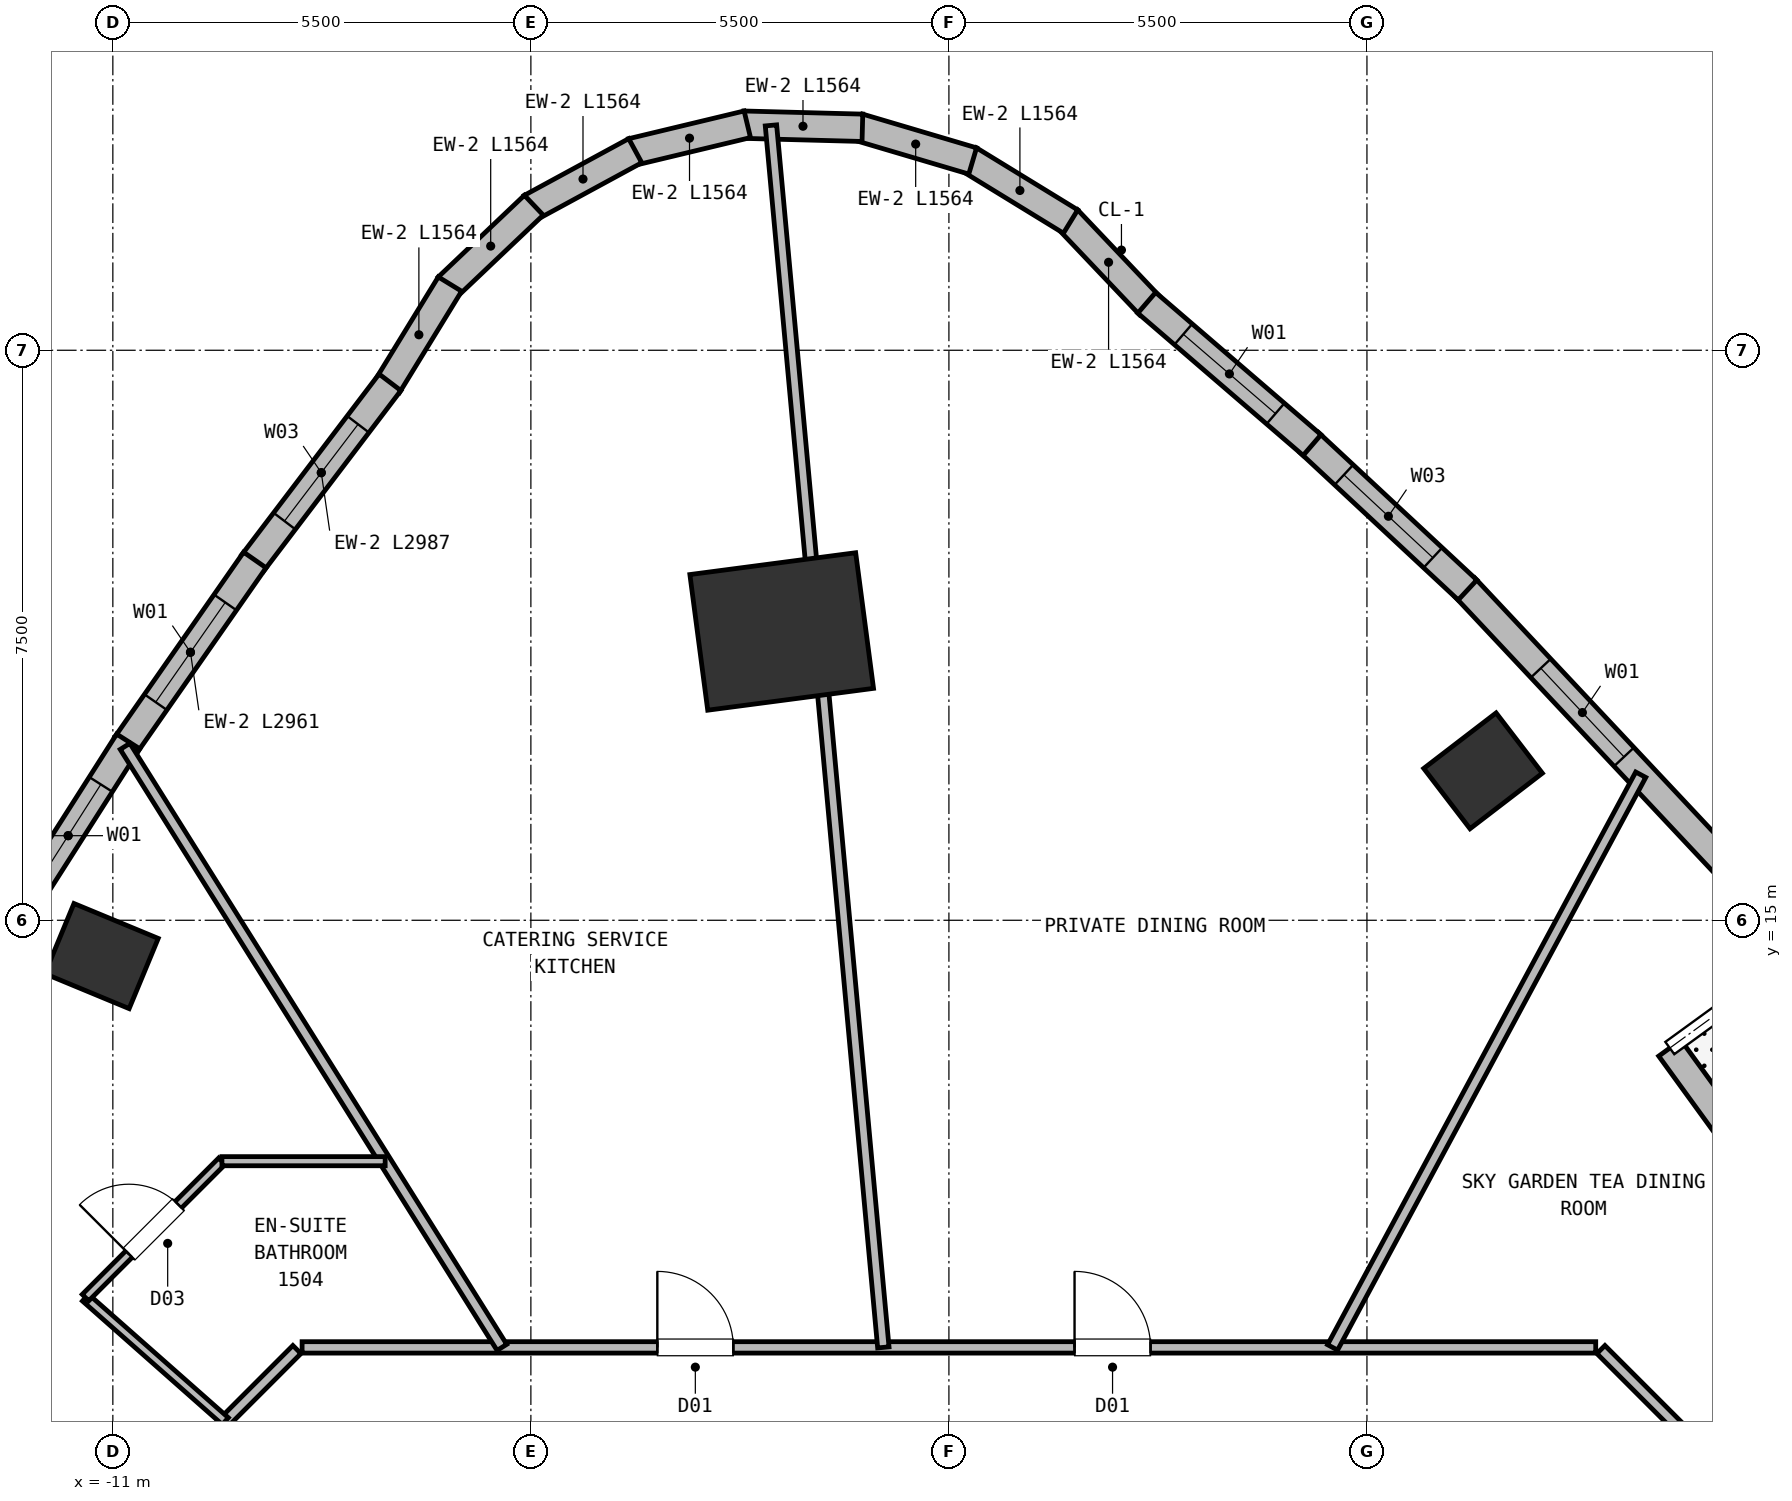
"""IFC4 building model, lengths in metres.
Left out: names, types, materials, properties, quantities, classifications, styles, units other than length and angle.
Written with IfcOpenShell. Run it as: python <this file> out.ifc"""

import sys

from ifc_helpers import new_model, si_unit, direction, frame, frame_2d, origin, origin_2d, place, context, subcontext, project, spatial, rectangle, extrude, element, fill, save


model = new_model("IFC4")
c1 = context("Model", 3, precision=1e-05, world=origin(), true_north=direction((0.0, 1.0)))
c2 = subcontext(c1, "Body", "Model", "MODEL_VIEW")
j1 = project(units=[si_unit("LENGTHUNIT", "METRE"), si_unit("PLANEANGLEUNIT", "RADIAN")], contexts=[c1])
p1 = place(None, origin())
s1 = spatial("IfcSite", under=j1, at=p1, CompositionType="ELEMENT")
p2 = place(p1, origin())
s2 = spatial("IfcBuilding", under=s1, at=p2, CompositionType="ELEMENT")
p3 = place(p2, frame((0.0, 0.0, 53.0)))
s3 = spatial("IfcBuildingStorey", under=s2, at=p3, CompositionType="ELEMENT", Elevation=53.0)
p4 = place(p3, frame((-2.2, 18.8, 0.0), z_axis=(0.0, 0.0, 1.0), x_axis=(-0.13052619222, 0.991444861374, 0.0)))
e1 = element("IfcColumn", 1, at=p4, inside=s3, PredefinedType="COLUMN", context=c2, shape_type="SweptSolid", body=[
    extrude(rectangle(XDim=1.8, YDim=2.2, at=origin_2d()), origin(), (0.0, 0.0, 1.0), 3.75),
])
for number, where, z_axis, x_axis in (
    (2, (-11.148, 14.529, 0.0), (0.0, 0.0, 1.0), (0.383, 0.924, 0.0)),
    (3, (7.028, 16.966, 0.0), (0.0, 0.0, 1.0), (-0.609, 0.793, 0.0)),
):
    element("IfcColumn", number, at=place(p3, frame(where, z_axis=z_axis, x_axis=x_axis)), inside=s3, PredefinedType="COLUMN", context=c2, shape_type="SweptSolid", body=[
        extrude(rectangle(XDim=1.0, YDim=1.2, at=origin_2d()), origin(), (0.0, 0.0, 1.0), 3.75),
    ])
p5 = place(p3, frame((9.485, 13.319, 0.0), z_axis=(0.0, 0.0, 1.0), x_axis=(0.587787785243, -0.809015154073, 0.0)))
e4 = element("IfcWall", 4, at=p5, inside=s3, PredefinedType="SOLIDWALL", context=c2, shape_type="SweptSolid", body=[
    extrude(rectangle(XDim=10.4, YDim=0.36, at=frame_2d((5.2, 0.0))), origin(), (0.0, 0.0, 1.0), 3.5),
])
p6 = place(p5, frame((6.0, 0.0, 0.0)))
e5 = element("IfcOpeningElement", 5, at=p6, cuts=e4, PredefinedType="OPENING", context=c2, shape_type="SweptSolid", body=[
    extrude(rectangle(XDim=1.65, YDim=2.25, at=frame_2d((0.825, 1.125))), frame((0.0, 0.19, 0.0), z_axis=(0.0, -1.0, 0.0), x_axis=(1.0, 0.0, 0.0)), (0.0, 0.0, 1.0), 0.38),
])
for number, where, z_axis, x_axis in (
    (6, (1.562, 24.225, 0.0), (0.0, 0.0, 1.0), (0.688, -0.725, 0.0)),
    (7, (0.267, 25.011, 0.0), (0.0, 0.0, 1.0), (0.853, -0.523, 0.0)),
):
    element("IfcWall", number, at=place(p3, frame(where, z_axis=z_axis, x_axis=x_axis)), inside=s3, PredefinedType="SOLIDWALL", context=c2, shape_type="SweptSolid", body=[
        extrude(rectangle(XDim=1.564, YDim=0.36, at=frame_2d((0.782, 0.0))), origin(), (0.0, 0.0, 1.0), 3.5),
    ])
p7 = place(p3, frame((-1.187, 25.435, 0.0), z_axis=(0.0, 0.0, 1.0), x_axis=(0.958804410816, -0.284067072714, 0.0)))
e8 = element("IfcWall", 8, at=p7, inside=s3, PredefinedType="SOLIDWALL", context=c2, shape_type="SweptSolid", body=[
    extrude(rectangle(XDim=1.564, YDim=0.36, at=frame_2d((0.782, 0.0))), origin(), (0.0, 0.0, 1.0), 3.5),
])
p8 = place(p3, frame((-2.702, 25.468, 0.0), z_axis=(0.0, 0.0, 1.0), x_axis=(0.999656076517, -0.026224581645, 0.0)))
e9 = element("IfcWall", 9, at=p8, inside=s3, PredefinedType="SOLIDWALL", context=c2, shape_type="SweptSolid", body=[
    extrude(rectangle(XDim=1.564, YDim=0.36, at=frame_2d((0.782, 0.0))), origin(), (0.0, 0.0, 1.0), 3.5),
])
for number, where, z_axis, x_axis in (
    (10, (-4.173, 25.108, 0.0), (0.0, 0.0, 1.0), (0.972, 0.233, 0.0)),
    (11, (-5.502, 24.38, 0.0), (0.0, 0.0, 1.0), (0.879, 0.477, 0.0)),
):
    element("IfcWall", number, at=place(p3, frame(where, z_axis=z_axis, x_axis=x_axis)), inside=s3, PredefinedType="SOLIDWALL", context=c2, shape_type="SweptSolid", body=[
        extrude(rectangle(XDim=1.564, YDim=0.36, at=frame_2d((0.782, 0.0))), origin(), (0.0, 0.0, 1.0), 3.5),
    ])
for number, where, z_axis, x_axis in (
    (12, (-6.596, 23.332, 0.0), (0.0, 0.0, 1.0), (0.725, 0.688, 0.0)),
    (13, (-7.382, 22.037, 0.0), (0.0, 0.0, 1.0), (0.523, 0.853, 0.0)),
):
    element("IfcWall", number, at=place(p3, frame(where, z_axis=z_axis, x_axis=x_axis)), inside=s3, PredefinedType="SOLIDWALL", context=c2, shape_type="SweptSolid", body=[
        extrude(rectangle(XDim=1.564, YDim=0.36, at=frame_2d((0.782, 0.0))), origin(), (0.0, 0.0, 1.0), 3.5),
    ])
p9 = place(p3, frame((-9.161, 19.7, 0.0), z_axis=(0.0, 0.0, 1.0), x_axis=(0.605023164489, 0.796207868858, 0.0)))
e14 = element("IfcWall", 14, at=p9, inside=s3, PredefinedType="SOLIDWALL", context=c2, shape_type="SweptSolid", body=[
    extrude(rectangle(XDim=2.987, YDim=0.36, at=frame_2d((1.493, 0.0))), origin(), (0.0, 0.0, 1.0), 3.5),
])
p10 = place(p9, frame((0.694, 0.0, 0.72)))
e15 = element("IfcOpeningElement", 15, at=p10, cuts=e14, PredefinedType="OPENING", context=c2, shape_type="SweptSolid", body=[
    extrude(rectangle(XDim=1.6, YDim=1.88, at=frame_2d((0.8, 0.94))), frame((0.0, 0.19, 0.0), z_axis=(0.0, -1.0, 0.0), x_axis=(1.0, 0.0, 0.0)), (0.0, 0.0, 1.0), 0.38),
])
p11 = place(p3, frame((-10.826, 17.311, 0.0), z_axis=(0.0, 0.0, 1.0), x_axis=(0.572022980857, 0.820237593245, 0.0)))
e16 = element("IfcWall", 16, at=p11, inside=s3, PredefinedType="SOLIDWALL", context=c2, shape_type="SweptSolid", body=[
    extrude(rectangle(XDim=2.962, YDim=0.36, at=frame_2d((1.481, 0.0))), origin(), (0.0, 0.0, 1.0), 3.5),
])
p12 = place(p11, frame((0.681, 0.0, 0.72)))
e17 = element("IfcOpeningElement", 17, at=p12, cuts=e16, PredefinedType="OPENING", context=c2, shape_type="SweptSolid", body=[
    extrude(rectangle(XDim=1.6, YDim=1.88, at=frame_2d((0.8, 0.94))), frame((0.0, 0.19, 0.0), z_axis=(0.0, -1.0, 0.0), x_axis=(1.0, 0.0, 0.0)), (0.0, 0.0, 1.0), 0.38),
])
p13 = place(p3, frame((-12.378, 14.873, 0.0), z_axis=(0.0, 0.0, 1.0), x_axis=(0.537417887212, 0.843316082204, 0.0)))
e18 = element("IfcWall", 18, at=p13, inside=s3, PredefinedType="SOLIDWALL", context=c2, shape_type="SweptSolid", body=[
    extrude(rectangle(XDim=2.941, YDim=0.36, at=frame_2d((1.47, 0.0))), origin(), (0.0, 0.0, 1.0), 3.5),
])
p14 = place(p13, frame((0.67, 0.0, 0.72)))
e19 = element("IfcOpeningElement", 19, at=p14, cuts=e18, PredefinedType="OPENING", context=c2, shape_type="SweptSolid", body=[
    extrude(rectangle(XDim=1.6, YDim=1.88, at=frame_2d((0.8, 0.94))), frame((0.0, 0.19, 0.0), z_axis=(0.0, -1.0, 0.0), x_axis=(1.0, 0.0, 0.0)), (0.0, 0.0, 1.0), 0.38),
])
p15 = place(p3, frame((6.788, 19.381, 0.0), z_axis=(0.0, 0.0, 1.0), x_axis=(0.684367736507, -0.729137025002, 0.0)))
e20 = element("IfcWall", 20, at=p15, inside=s3, PredefinedType="SOLIDWALL", context=c2, shape_type="SweptSolid", body=[
    extrude(rectangle(XDim=6.566, YDim=0.36, at=frame_2d((3.283, 0.0))), origin(), (0.0, 0.0, 1.0), 3.5),
])
p16 = place(p15, frame((1.46, 0.0, 0.72)))
e21 = element("IfcOpeningElement", 21, at=p16, cuts=e20, PredefinedType="OPENING", context=c2, shape_type="SweptSolid", body=[
    extrude(rectangle(XDim=1.6, YDim=1.88, at=frame_2d((0.8, 0.94))), frame((0.0, 0.19, 0.0), z_axis=(0.0, -1.0, 0.0), x_axis=(1.0, 0.0, 0.0)), (0.0, 0.0, 1.0), 0.38),
])
p17 = place(p3, frame((4.741, 21.286, 0.0), z_axis=(0.0, 0.0, 1.0), x_axis=(0.731750871634, -0.68157219857, 0.0)))
e22 = element("IfcWall", 22, at=p17, inside=s3, PredefinedType="SOLIDWALL", context=c2, shape_type="SweptSolid", body=[
    extrude(rectangle(XDim=2.846, YDim=0.36, at=frame_2d((1.423, 0.0))), origin(), (0.0, 0.0, 1.0), 3.5),
])
p18 = place(p17, frame((0.623, 0.0, 0.72)))
e23 = element("IfcOpeningElement", 23, at=p18, cuts=e22, PredefinedType="OPENING", context=c2, shape_type="SweptSolid", body=[
    extrude(rectangle(XDim=1.6, YDim=1.88, at=frame_2d((0.8, 0.94))), frame((0.0, 0.19, 0.0), z_axis=(0.0, -1.0, 0.0), x_axis=(1.0, 0.0, 0.0)), (0.0, 0.0, 1.0), 0.38),
])
p19 = place(p3, frame((2.603, 23.125, 0.0), z_axis=(0.0, 0.0, 1.0), x_axis=(0.757915995352, -0.652352162554, 0.0)))
e24 = element("IfcWall", 24, at=p19, inside=s3, PredefinedType="SOLIDWALL", context=c2, shape_type="SweptSolid", body=[
    extrude(rectangle(XDim=2.87, YDim=0.36, at=frame_2d((1.435, 0.0))), origin(), (0.0, 0.0, 1.0), 3.5),
])
p20 = place(p19, frame((0.635, 0.0, 0.72)))
e25 = element("IfcOpeningElement", 25, at=p20, cuts=e24, PredefinedType="OPENING", context=c2, shape_type="SweptSolid", body=[
    extrude(rectangle(XDim=1.6, YDim=1.88, at=frame_2d((0.8, 0.94))), frame((0.0, 0.19, 0.0), z_axis=(0.0, -1.0, 0.0), x_axis=(1.0, 0.0, 0.0)), (0.0, 0.0, 1.0), 0.38),
])
p21 = place(p3, frame((8.578, 9.352, 0.0), z_axis=(0.0, 0.0, 1.0), x_axis=(0.707067066127, -0.707146494016, 0.0)))
e26 = element("IfcWall", 26, at=p21, inside=s3, PredefinedType="PARTITIONING", context=c2, shape_type="SweptSolid", body=[
    extrude(rectangle(XDim=3.074, YDim=0.15, at=frame_2d((1.537, 0.0))), origin(), (0.0, 0.0, 1.0), 3.5),
])
p22 = place(p3, frame((-8.51, 9.38, 0.0), z_axis=(0.0, 0.0, 1.0), x_axis=(1.0, 0.0, 0.0)))
e27 = element("IfcWall", 27, at=p22, inside=s3, PredefinedType="PARTITIONING", context=c2, shape_type="SweptSolid", body=[
    extrude(rectangle(XDim=17.02, YDim=0.15, at=frame_2d((8.51, 0.0))), origin(), (0.0, 0.0, 1.0), 3.5),
])
p23 = place(p22, frame((4.674, 0.0, 0.0)))
e28 = element("IfcOpeningElement", 28, at=p23, cuts=e27, PredefinedType="OPENING", context=c2, shape_type="SweptSolid", body=[
    extrude(rectangle(XDim=1.0, YDim=2.15, at=frame_2d((0.5, 1.075))), frame((0.0, 0.085, 0.0), z_axis=(0.0, -1.0, 0.0), x_axis=(1.0, 0.0, 0.0)), (0.0, 0.0, 1.0), 0.17),
])
p24 = place(p22, frame((10.163, 0.0, 0.0)))
e29 = element("IfcOpeningElement", 29, at=p24, cuts=e27, PredefinedType="OPENING", context=c2, shape_type="SweptSolid", body=[
    extrude(rectangle(XDim=1.0, YDim=2.15, at=frame_2d((0.5, 1.075))), frame((0.0, 0.085, 0.0), z_axis=(0.0, -1.0, 0.0), x_axis=(1.0, 0.0, 0.0)), (0.0, 0.0, 1.0), 0.17),
])
p25 = place(p3, frame((-10.752, 7.178, 0.0), z_axis=(0.0, 0.0, 1.0), x_axis=(0.707067066127, 0.707146494016, 0.0)))
e30 = element("IfcWall", 30, at=p25, inside=s3, PredefinedType="PARTITIONING", context=c2, shape_type="SweptSolid", body=[
    extrude(rectangle(XDim=3.074, YDim=0.15, at=frame_2d((1.537, 0.0))), origin(), (0.0, 0.0, 1.0), 3.5),
])
p26 = place(p3, frame((5.048, 9.38, 0.0), z_axis=(0.0, 0.0, 1.0), x_axis=(0.473842892952, 0.880609398541, 0.0)))
e31 = element("IfcWall", 31, at=p26, inside=s3, PredefinedType="PARTITIONING", context=c2, shape_type="SweptSolid", body=[
    extrude(rectangle(XDim=8.557, YDim=0.15, at=frame_2d((4.279, 0.0))), origin(), (0.0, 0.0, 1.0), 3.5),
])
p27 = place(p3, frame((-0.863, 9.38, 0.0), z_axis=(0.0, 0.0, 1.0), x_axis=(-0.091567710563, 0.99579885237, 0.0)))
e32 = element("IfcWall", 32, at=p27, inside=s3, PredefinedType="PARTITIONING", context=c2, shape_type="SweptSolid", body=[
    extrude(rectangle(XDim=16.147, YDim=0.15, at=frame_2d((8.073, 0.0))), origin(), (0.0, 0.0, 1.0), 3.5),
])
p28 = place(p3, frame((-5.881, 9.38, 0.0), z_axis=(0.0, 0.0, 1.0), x_axis=(-0.531202169705, 0.847245097301, 0.0)))
e33 = element("IfcWall", 33, at=p28, inside=s3, PredefinedType="PARTITIONING", context=c2, shape_type="SweptSolid", body=[
    extrude(rectangle(XDim=9.334, YDim=0.15, at=frame_2d((4.667, 0.0))), origin(), (0.0, 0.0, 1.0), 3.5),
])
p29 = place(p3, frame((-9.52, 8.41, 0.0), z_axis=(0.0, 0.0, 1.0), x_axis=(-0.749512689339, 0.661989976147, 0.0)))
e34 = element("IfcWall", 34, at=p29, inside=s3, PredefinedType="PARTITIONING", context=c2, shape_type="SweptSolid", body=[
    extrude(rectangle(XDim=2.455, YDim=0.12, at=frame_2d((1.228, 0.0))), origin(), (0.0, 0.0, 1.0), 3.5),
])
p30 = place(p3, frame((-11.36, 10.035, 0.0), z_axis=(0.0, 0.0, 1.0), x_axis=(0.707154859159, 0.707058699945, 0.0)))
e35 = element("IfcWall", 35, at=p30, inside=s3, PredefinedType="PARTITIONING", context=c2, shape_type="SweptSolid", body=[
    extrude(rectangle(XDim=2.539, YDim=0.12, at=frame_2d((1.27, 0.0))), origin(), (0.0, 0.0, 1.0), 3.5),
])
p31 = place(p30, frame((0.809, 0.0, 0.0)))
e36 = element("IfcOpeningElement", 36, at=p31, cuts=e35, PredefinedType="OPENING", context=c2, shape_type="SweptSolid", body=[
    extrude(rectangle(XDim=0.92, YDim=2.1, at=frame_2d((0.46, 1.05))), frame((0.0, 0.07, 0.0), z_axis=(0.0, -1.0, 0.0), x_axis=(1.0, 0.0, 0.0)), (0.0, 0.0, 1.0), 0.14),
])
p32 = place(p3, frame((-7.417, 11.83, 0.0), z_axis=(0.0, 0.0, 1.0), x_axis=(-1.0, 0.0, 0.0)))
e37 = element("IfcWall", 37, at=p32, inside=s3, PredefinedType="PARTITIONING", context=c2, shape_type="SweptSolid", body=[
    extrude(rectangle(XDim=2.147, YDim=0.12, at=frame_2d((1.074, 0.0))), origin(), (0.0, 0.0, 1.0), 3.5),
])
p33 = place(p10, origin())
e38 = element("IfcWindow", 38, at=p33, inside=s3, PartitioningType="SINGLE_PANEL", PredefinedType="WINDOW", context=c2, shape_type="SweptSolid", body=[
    extrude(rectangle(XDim=1.6, YDim=1.88, at=frame_2d((0.8, 0.94))), frame((0.0, 0.03, 0.0), z_axis=(0.0, -1.0, 0.0), x_axis=(1.0, 0.0, 0.0)), (0.0, 0.0, 1.0), 0.06),
])
fill(e15, e38)
p34 = place(p12, origin())
e39 = element("IfcWindow", 39, at=p34, inside=s3, PartitioningType="SINGLE_PANEL", PredefinedType="WINDOW", context=c2, shape_type="SweptSolid", body=[
    extrude(rectangle(XDim=1.6, YDim=1.88, at=frame_2d((0.8, 0.94))), frame((0.0, 0.03, 0.0), z_axis=(0.0, -1.0, 0.0), x_axis=(1.0, 0.0, 0.0)), (0.0, 0.0, 1.0), 0.06),
])
fill(e17, e39)
p35 = place(p14, origin())
e40 = element("IfcWindow", 40, at=p35, inside=s3, PartitioningType="SINGLE_PANEL", PredefinedType="WINDOW", context=c2, shape_type="SweptSolid", body=[
    extrude(rectangle(XDim=1.6, YDim=1.88, at=frame_2d((0.8, 0.94))), frame((0.0, 0.03, 0.0), z_axis=(0.0, -1.0, 0.0), x_axis=(1.0, 0.0, 0.0)), (0.0, 0.0, 1.0), 0.06),
])
fill(e19, e40)
p36 = place(p16, origin())
e41 = element("IfcWindow", 41, at=p36, inside=s3, PartitioningType="SINGLE_PANEL", PredefinedType="WINDOW", context=c2, shape_type="SweptSolid", body=[
    extrude(rectangle(XDim=1.6, YDim=1.88, at=frame_2d((0.8, 0.94))), frame((0.0, 0.03, 0.0), z_axis=(0.0, -1.0, 0.0), x_axis=(1.0, 0.0, 0.0)), (0.0, 0.0, 1.0), 0.06),
])
fill(e21, e41)
p37 = place(p18, origin())
e42 = element("IfcWindow", 42, at=p37, inside=s3, PartitioningType="SINGLE_PANEL", PredefinedType="WINDOW", context=c2, shape_type="SweptSolid", body=[
    extrude(rectangle(XDim=1.6, YDim=1.88, at=frame_2d((0.8, 0.94))), frame((0.0, 0.03, 0.0), z_axis=(0.0, -1.0, 0.0), x_axis=(1.0, 0.0, 0.0)), (0.0, 0.0, 1.0), 0.06),
])
fill(e23, e42)
p38 = place(p20, origin())
e43 = element("IfcWindow", 43, at=p38, inside=s3, PartitioningType="SINGLE_PANEL", PredefinedType="WINDOW", context=c2, shape_type="SweptSolid", body=[
    extrude(rectangle(XDim=1.6, YDim=1.88, at=frame_2d((0.8, 0.94))), frame((0.0, 0.03, 0.0), z_axis=(0.0, -1.0, 0.0), x_axis=(1.0, 0.0, 0.0)), (0.0, 0.0, 1.0), 0.06),
])
fill(e25, e43)
p39 = place(p31, origin())
e44 = element("IfcDoor", 44, at=p39, inside=s3, OperationType="SINGLE_SWING_LEFT", PredefinedType="DOOR", context=c2, shape_type="SweptSolid", body=[
    extrude(rectangle(XDim=0.92, YDim=2.1, at=frame_2d((0.46, 1.05))), frame((0.0, 0.025, 0.0), z_axis=(0.0, -1.0, 0.0), x_axis=(1.0, 0.0, 0.0)), (0.0, 0.0, 1.0), 0.05),
])
fill(e36, e44)
p40 = place(p23, origin())
e45 = element("IfcDoor", 45, at=p40, inside=s3, OperationType="SINGLE_SWING_LEFT", PredefinedType="DOOR", context=c2, shape_type="SweptSolid", body=[
    extrude(rectangle(XDim=1.0, YDim=2.15, at=frame_2d((0.5, 1.075))), frame((0.0, 0.025, 0.0), z_axis=(0.0, -1.0, 0.0), x_axis=(1.0, 0.0, 0.0)), (0.0, 0.0, 1.0), 0.05),
])
fill(e28, e45)
p41 = place(p24, origin())
e46 = element("IfcDoor", 46, at=p41, inside=s3, OperationType="SINGLE_SWING_LEFT", PredefinedType="DOOR", context=c2, shape_type="SweptSolid", body=[
    extrude(rectangle(XDim=1.0, YDim=2.15, at=frame_2d((0.5, 1.075))), frame((0.0, 0.025, 0.0), z_axis=(0.0, -1.0, 0.0), x_axis=(1.0, 0.0, 0.0)), (0.0, 0.0, 1.0), 0.05),
])
fill(e29, e46)
save(model, sys.argv[1])
